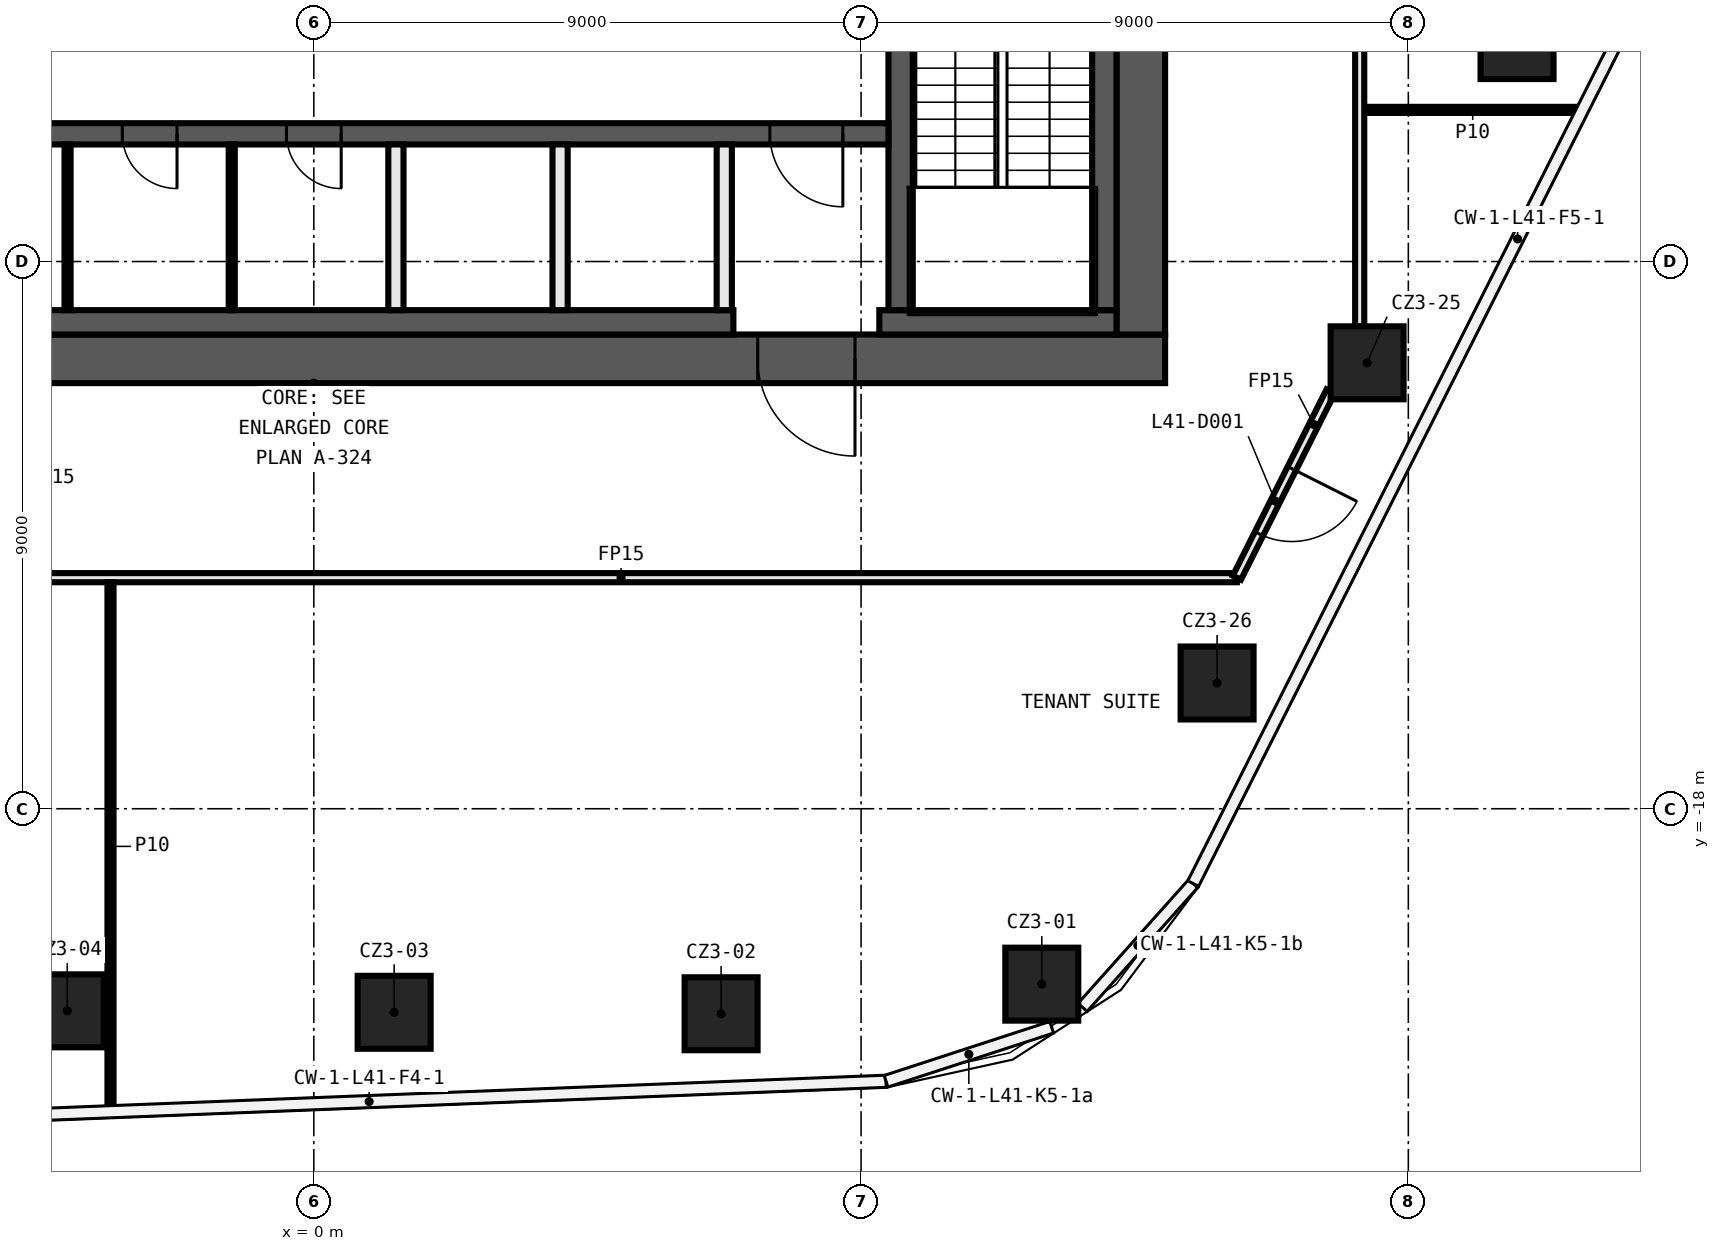
"""IFC4 building model, lengths in metres.
Left out: names, types, materials, properties, quantities, classifications, styles, units other than length and angle.
Written with IfcOpenShell. Run it as: python <this file> out.ifc"""

import sys

from ifc_helpers import new_model, si_unit, direction, frame, frame_2d, origin, origin_2d, place, context, subcontext, project, spatial, rectangle, extrude, element, fill, save


model = new_model("IFC4")
c1 = context("Model", 3, precision=1e-05, world=origin(), true_north=direction((0.0, 1.0)))
c2 = subcontext(c1, "Body", "Model", "MODEL_VIEW")
j1 = project(units=[si_unit("LENGTHUNIT", "METRE"), si_unit("PLANEANGLEUNIT", "RADIAN")], contexts=[c1])
p1 = place(None, origin())
s1 = spatial("IfcSite", under=j1, at=p1, CompositionType="ELEMENT")
p2 = place(p1, origin())
s2 = spatial("IfcBuilding", under=s1, at=p2, CompositionType="ELEMENT")
p3 = place(p2, frame((0.0, 0.0, 198.8)))
s3 = spatial("IfcBuildingStorey", under=s2, at=p3, CompositionType="ELEMENT", Elevation=198.8)
for number, where, z_axis, x_axis in (
    (1, (11.972, -20.885, 0.0), (0.0, 0.0, 1.0), (1.0, 0.0, 0.0)),
    (2, (6.698, -21.372, 0.0), (0.0, 0.0, 1.0), (1.0, 0.0, 0.0)),
    (3, (1.321, -21.348, 0.0), (0.0, 0.0, 1.0), (1.0, 0.0, 0.0)),
    (4, (-4.055, -21.324, 0.0), (0.0, 0.0, 1.0), (1.0, 0.0, 0.0)),
    (5, (19.788, -5.399, 0.0), (0.0, 0.0, 1.0), (1.0, 0.0, 0.0)),
    (6, (17.322, -10.666, 0.0), (0.0, 0.0, 1.0), (1.0, 0.0, 0.0)),
    (7, (14.855, -15.932, 0.0), (0.0, 0.0, 1.0), (1.0, 0.0, 0.0)),
):
    element("IfcColumn", number, at=place(p3, frame(where, z_axis=z_axis, x_axis=x_axis)), inside=s3, PredefinedType="COLUMN", context=c2, shape_type="SweptSolid", body=[
        extrude(rectangle(XDim=1.2, YDim=1.2, at=origin_2d()), origin(), (0.0, 0.0, 1.0), 3.82),
    ])
p4 = place(p3, frame((-5.075, -14.2, 0.0), z_axis=(0.0, 0.0, 1.0), x_axis=(1.0, 0.0, 0.0)))
e8 = element("IfcWall", 8, at=p4, inside=s3, PredefinedType="PARTITIONING", context=c2, shape_type="SweptSolid", body=[
    extrude(rectangle(XDim=20.255, YDim=0.15, at=frame_2d((10.127, 0.0))), origin(), (0.0, 0.0, 1.0), 3.82),
])
p5 = place(p3, frame((17.275, -6.506, 0.0), z_axis=(0.0, 0.0, 1.0), x_axis=(1.0, 0.0, 0.0)))
e9 = element("IfcWall", 9, at=p5, inside=s3, PredefinedType="PARTITIONING", context=c2, shape_type="SweptSolid", body=[
    extrude(rectangle(XDim=3.568, YDim=0.1, at=frame_2d((1.784, 0.0))), origin(), (0.0, 0.0, 1.0), 3.82),
])
p6 = place(p3, frame((16.722, -11.136, 0.0), z_axis=(0.0, 0.0, 1.0), x_axis=(-0.449461267312, -0.893299820433, 0.0)))
e10 = element("IfcWall", 10, at=p6, inside=s3, PredefinedType="PARTITIONING", context=c2, shape_type="SweptSolid", body=[
    extrude(rectangle(XDim=3.43, YDim=0.15, at=frame_2d((1.715, 0.0))), origin(), (0.0, 0.0, 1.0), 3.82),
])
p7 = place(p6, frame((1.421, 0.0, 0.0)))
e11 = element("IfcOpeningElement", 11, at=p7, cuts=e10, PredefinedType="OPENING", context=c2, shape_type="SweptSolid", body=[
    extrude(rectangle(XDim=1.2, YDim=2.1, at=frame_2d((0.6, 1.05))), frame((0.0, 0.085, 0.0), z_axis=(0.0, -1.0, 0.0), x_axis=(1.0, 0.0, 0.0)), (0.0, 0.0, 1.0), 0.17),
])
p8 = place(p3, frame((17.2, 13.106, 0.0), z_axis=(0.0, 0.0, 1.0), x_axis=(0.0, -1.0, 0.0)))
e12 = element("IfcWall", 12, at=p8, inside=s3, PredefinedType="PARTITIONING", context=c2, shape_type="SweptSolid", body=[
    extrude(rectangle(XDim=23.172, YDim=0.15, at=frame_2d((11.586, 0.0))), origin(), (0.0, 0.0, 1.0), 3.82),
])
p9 = place(p8, frame((4.412, 0.0, 0.0)))
e13 = element("IfcOpeningElement", 13, at=p9, cuts=e12, PredefinedType="OPENING", context=c2, shape_type="SweptSolid", body=[
    extrude(rectangle(XDim=1.2, YDim=2.1, at=frame_2d((0.6, 1.05))), frame((0.0, 0.085, 0.0), z_axis=(0.0, -1.0, 0.0), x_axis=(1.0, 0.0, 0.0)), (0.0, 0.0, 1.0), 0.17),
])
p10 = place(p3, frame((-3.344, -22.964, 0.0), z_axis=(0.0, 0.0, 1.0), x_axis=(0.0, 1.0, 0.0)))
e14 = element("IfcWall", 14, at=p10, inside=s3, PredefinedType="PARTITIONING", context=c2, shape_type="SweptSolid", body=[
    extrude(rectangle(XDim=8.689, YDim=0.1, at=frame_2d((4.344, 0.0))), origin(), (0.0, 0.0, 1.0), 3.82),
])
p11 = place(p3, frame((14.0, -10.6, 0.0), z_axis=(0.0, 0.0, 1.0), x_axis=(-1.0, 0.0, 0.0)))
e15 = element("IfcWall", 15, at=p11, inside=s3, PredefinedType="SHEAR", context=c2, shape_type="SweptSolid", body=[
    extrude(rectangle(XDim=28.0, YDim=0.8, at=frame_2d((14.0, 0.0))), origin(), (0.0, 0.0, 1.0), 3.82),
])
p12 = place(p11, frame((5.1, 0.0, 0.0)))
e16 = element("IfcOpeningElement", 16, at=p12, cuts=e15, PredefinedType="OPENING", context=c2, shape_type="SweptSolid", body=[
    extrude(rectangle(XDim=1.6, YDim=2.1, at=frame_2d((0.8, 1.05))), frame((0.0, 0.41, 0.0), z_axis=(0.0, -1.0, 0.0), x_axis=(1.0, 0.0, 0.0)), (0.0, 0.0, 1.0), 0.82),
])
p13 = place(p3, frame((13.6, 10.2, 0.0), z_axis=(0.0, 0.0, 1.0), x_axis=(0.0, -1.0, 0.0)))
e17 = element("IfcWall", 17, at=p13, inside=s3, PredefinedType="SHEAR", context=c2, shape_type="SweptSolid", body=[
    extrude(rectangle(XDim=20.4, YDim=0.8, at=frame_2d((10.2, 0.0))), origin(), (0.0, 0.0, 1.0), 3.82),
])
p14 = place(p3, frame((13.2, -10.0, 0.0), z_axis=(0.0, 0.0, 1.0), x_axis=(-1.0, 0.0, 0.0)))
e18 = element("IfcWall", 18, at=p14, inside=s3, PredefinedType="SHEAR", context=c2, shape_type="SweptSolid", body=[
    extrude(rectangle(XDim=3.9, YDim=0.4, at=frame_2d((1.95, 0.0))), origin(), (0.0, 0.0, 1.0), 3.82),
])
p15 = place(p3, frame((6.9, -10.0, 0.0), z_axis=(0.0, 0.0, 1.0), x_axis=(-1.0, 0.0, 0.0)))
e19 = element("IfcWall", 19, at=p15, inside=s3, PredefinedType="SHEAR", context=c2, shape_type="SweptSolid", body=[
    extrude(rectangle(XDim=20.1, YDim=0.4, at=frame_2d((10.05, 0.0))), origin(), (0.0, 0.0, 1.0), 3.82),
])
p16 = place(p3, frame((13.0, 9.8, 0.0), z_axis=(0.0, 0.0, 1.0), x_axis=(0.0, -1.0, 0.0)))
e20 = element("IfcWall", 20, at=p16, inside=s3, PredefinedType="SHEAR", context=c2, shape_type="SweptSolid", body=[
    extrude(rectangle(XDim=19.6, YDim=0.4, at=frame_2d((9.8, 0.0))), origin(), (0.0, 0.0, 1.0), 3.82),
])
p17 = place(p3, frame((9.65, -2.3, 0.0), z_axis=(0.0, 0.0, 1.0), x_axis=(0.0, -1.0, 0.0)))
e21 = element("IfcWall", 21, at=p17, inside=s3, PredefinedType="SHEAR", context=c2, shape_type="SweptSolid", body=[
    extrude(rectangle(XDim=7.5, YDim=0.4, at=frame_2d((3.75, 0.0))), origin(), (0.0, 0.0, 1.0), 3.82),
])
p18 = place(p17, frame((1.2, 0.0, 0.0)))
e22 = element("IfcOpeningElement", 22, at=p18, cuts=e21, PredefinedType="OPENING", context=c2, shape_type="SweptSolid", body=[
    extrude(rectangle(XDim=1.2, YDim=2.1, at=frame_2d((0.6, 1.05))), frame((0.0, 0.21, 0.0), z_axis=(0.0, -1.0, 0.0), x_axis=(1.0, 0.0, 0.0)), (0.0, 0.0, 1.0), 0.42),
])
p19 = place(p3, frame((9.45, -6.9, 0.0), z_axis=(0.0, 0.0, 1.0), x_axis=(-1.0, 0.0, 0.0)))
e23 = element("IfcWall", 23, at=p19, inside=s3, PredefinedType="SHEAR", context=c2, shape_type="SweptSolid", body=[
    extrude(rectangle(XDim=18.9, YDim=0.35, at=frame_2d((9.45, 0.0))), origin(), (0.0, 0.0, 1.0), 3.82),
])
p20 = place(p19, frame((0.75, 0.0, 0.0)))
e24 = element("IfcOpeningElement", 24, at=p20, cuts=e23, PredefinedType="OPENING", context=c2, shape_type="SweptSolid", body=[
    extrude(rectangle(XDim=1.2, YDim=2.1, at=frame_2d((0.6, 1.05))), frame((0.0, 0.185, 0.0), z_axis=(0.0, -1.0, 0.0), x_axis=(1.0, 0.0, 0.0)), (0.0, 0.0, 1.0), 0.37),
])
p21 = place(p19, frame((17.1, 0.0, 0.0)))
e25 = element("IfcOpeningElement", 25, at=p21, cuts=e23, PredefinedType="OPENING", context=c2, shape_type="SweptSolid", body=[
    extrude(rectangle(XDim=0.9, YDim=2.1, at=frame_2d((0.45, 1.05))), frame((0.0, 0.185, 0.0), z_axis=(0.0, -1.0, 0.0), x_axis=(1.0, 0.0, 0.0)), (0.0, 0.0, 1.0), 0.37),
])
p22 = place(p19, frame((14.4, 0.0, 0.0)))
e26 = element("IfcOpeningElement", 26, at=p22, cuts=e23, PredefinedType="OPENING", context=c2, shape_type="SweptSolid", body=[
    extrude(rectangle(XDim=0.9, YDim=2.1, at=frame_2d((0.45, 1.05))), frame((0.0, 0.185, 0.0), z_axis=(0.0, -1.0, 0.0), x_axis=(1.0, 0.0, 0.0)), (0.0, 0.0, 1.0), 0.37),
])
p23 = place(p19, frame((11.7, 0.0, 0.0)))
e27 = element("IfcOpeningElement", 27, at=p23, cuts=e23, PredefinedType="OPENING", context=c2, shape_type="SweptSolid", body=[
    extrude(rectangle(XDim=0.9, YDim=2.1, at=frame_2d((0.45, 1.05))), frame((0.0, 0.185, 0.0), z_axis=(0.0, -1.0, 0.0), x_axis=(1.0, 0.0, 0.0)), (0.0, 0.0, 1.0), 0.37),
])
p24 = place(p19, frame((9.0, 0.0, 0.0)))
e28 = element("IfcOpeningElement", 28, at=p24, cuts=e23, PredefinedType="OPENING", context=c2, shape_type="SweptSolid", body=[
    extrude(rectangle(XDim=0.9, YDim=2.1, at=frame_2d((0.45, 1.05))), frame((0.0, 0.185, 0.0), z_axis=(0.0, -1.0, 0.0), x_axis=(1.0, 0.0, 0.0)), (0.0, 0.0, 1.0), 0.37),
])
for number, where, z_axis, x_axis in (
    (29, (6.75, -9.8, 0.0), (0.0, 0.0, 1.0), (0.0, 1.0, 0.0)),
    (30, (4.05, -9.8, 0.0), (0.0, 0.0, 1.0), (0.0, 1.0, 0.0)),
    (31, (1.35, -9.8, 0.0), (0.0, 0.0, 1.0), (0.0, 1.0, 0.0)),
):
    element("IfcWall", number, at=place(p3, frame(where, z_axis=z_axis, x_axis=x_axis)), inside=s3, PredefinedType="SOLIDWALL", context=c2, shape_type="SweptSolid", body=[
        extrude(rectangle(XDim=2.725, YDim=0.25, at=frame_2d((1.363, 0.0))), origin(), (0.0, 0.0, 1.0), 3.82),
    ])
for number, where, z_axis, x_axis in (
    (32, (-1.35, -9.8, 0.0), (0.0, 0.0, 1.0), (0.0, 1.0, 0.0)),
    (33, (-4.05, -9.8, 0.0), (0.0, 0.0, 1.0), (0.0, 1.0, 0.0)),
):
    element("IfcWall", number, at=place(p3, frame(where, z_axis=z_axis, x_axis=x_axis)), inside=s3, PredefinedType="PARTITIONING", context=c2, shape_type="SweptSolid", body=[
        extrude(rectangle(XDim=2.725, YDim=0.1, at=frame_2d((1.363, 0.0))), origin(), (0.0, 0.0, 1.0), 3.82),
    ])
p25 = place(p7, origin())
e34 = element("IfcDoor", 34, at=p25, inside=s3, OperationType="SINGLE_SWING_RIGHT", PredefinedType="DOOR", context=c2, shape_type="SweptSolid", body=[
    extrude(rectangle(XDim=1.2, YDim=2.1, at=frame_2d((0.6, 1.05))), frame((0.0, 0.025, 0.0), z_axis=(0.0, -1.0, 0.0), x_axis=(1.0, 0.0, 0.0)), (0.0, 0.0, 1.0), 0.05),
])
fill(e11, e34)
p26 = place(p12, origin())
e35 = element("IfcDoor", 35, at=p26, inside=s3, OperationType="DOUBLE_DOOR_SINGLE_SWING", PredefinedType="DOOR", context=c2, shape_type="SweptSolid", body=[
    extrude(rectangle(XDim=1.6, YDim=2.1, at=frame_2d((0.8, 1.05))), frame((0.0, 0.025, 0.0), z_axis=(0.0, -1.0, 0.0), x_axis=(1.0, 0.0, 0.0)), (0.0, 0.0, 1.0), 0.05),
])
fill(e16, e35)
p27 = place(p20, origin())
e36 = element("IfcDoor", 36, at=p27, inside=s3, OperationType="SINGLE_SWING_LEFT", PredefinedType="DOOR", context=c2, shape_type="SweptSolid", body=[
    extrude(rectangle(XDim=1.2, YDim=2.1, at=frame_2d((0.6, 1.05))), frame((0.0, 0.025, 0.0), z_axis=(0.0, -1.0, 0.0), x_axis=(1.0, 0.0, 0.0)), (0.0, 0.0, 1.0), 0.05),
])
fill(e24, e36)
p28 = place(p23, origin())
e37 = element("IfcDoor", 37, at=p28, inside=s3, OperationType="SINGLE_SWING_LEFT", PredefinedType="DOOR", context=c2, shape_type="SweptSolid", body=[
    extrude(rectangle(XDim=0.9, YDim=2.1, at=frame_2d((0.45, 1.05))), frame((0.0, 0.025, 0.0), z_axis=(0.0, -1.0, 0.0), x_axis=(1.0, 0.0, 0.0)), (0.0, 0.0, 1.0), 0.05),
])
fill(e27, e37)
p29 = place(p24, origin())
e38 = element("IfcDoor", 38, at=p29, inside=s3, OperationType="SINGLE_SWING_RIGHT", PredefinedType="DOOR", context=c2, shape_type="SweptSolid", body=[
    extrude(rectangle(XDim=0.9, YDim=2.1, at=frame_2d((0.45, 1.05))), frame((0.0, 0.025, 0.0), z_axis=(0.0, -1.0, 0.0), x_axis=(1.0, 0.0, 0.0)), (0.0, 0.0, 1.0), 0.05),
])
fill(e28, e38)
save(model, sys.argv[1])
